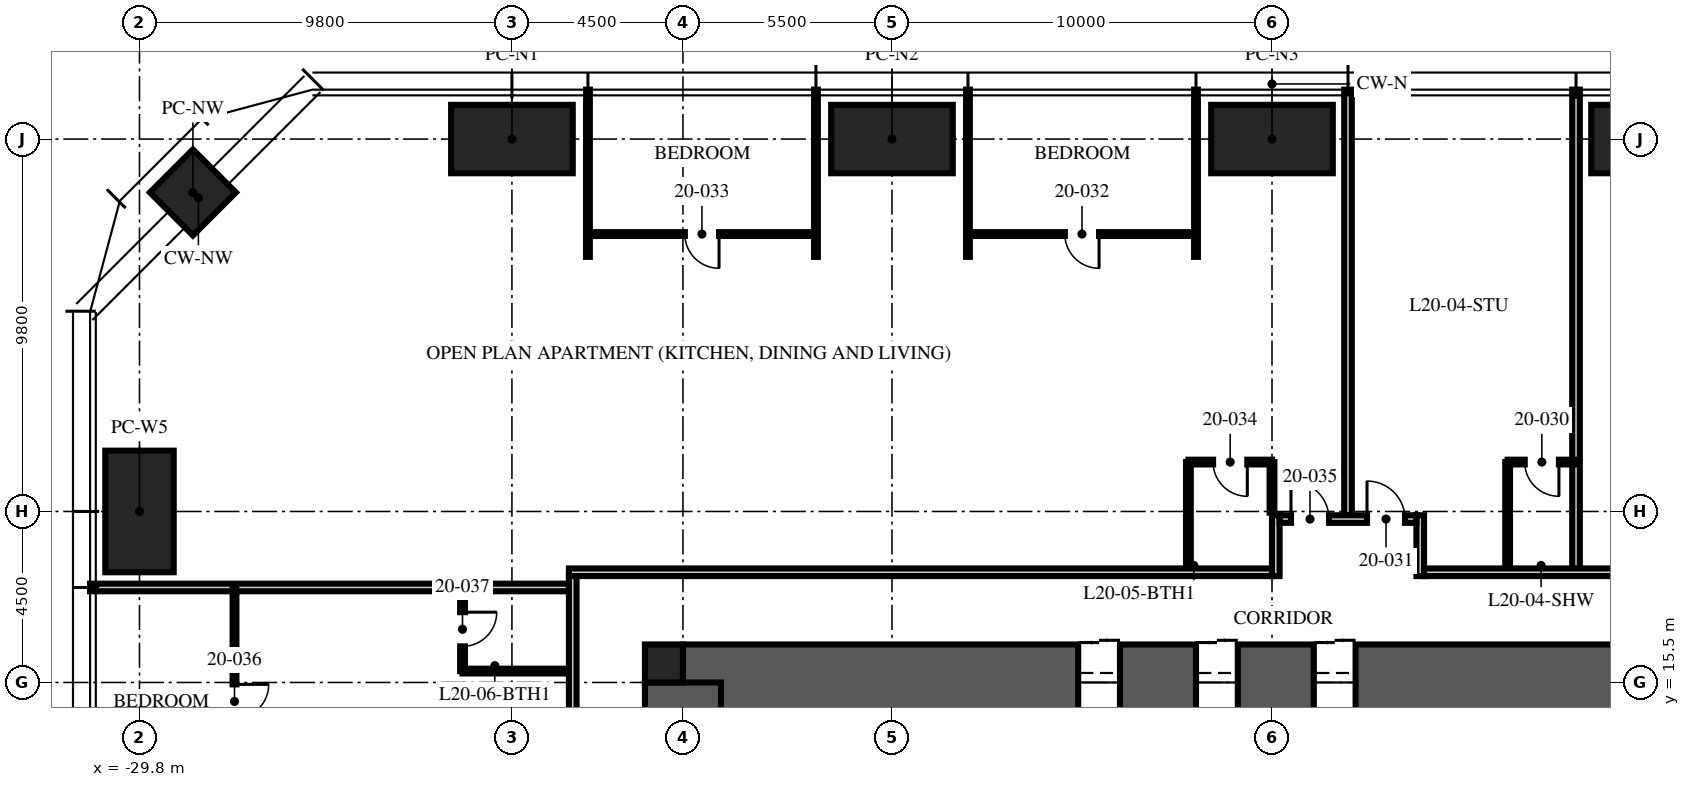
"""IFC4 building model, lengths in metres.
Left out: names, types, materials, properties, quantities, classifications, styles, units other than length and angle.
Written with IfcOpenShell. Run it as: python <this file> out.ifc"""

import sys

from ifc_helpers import new_model, si_unit, direction, frame, frame_2d, origin, origin_2d, place, context, subcontext, project, spatial, rectangle, hollow_rectangle, extrude, element, fill, save


model = new_model("IFC4")
c1 = context("Model", 3, precision=1e-05, world=origin(), true_north=direction((0.0, 1.0)))
c2 = subcontext(c1, "Body", "Model", "MODEL_VIEW")
j1 = project(units=[si_unit("LENGTHUNIT", "METRE"), si_unit("PLANEANGLEUNIT", "RADIAN")], contexts=[c1])
p1 = place(None, origin())
s1 = spatial("IfcSite", under=j1, at=p1, CompositionType="ELEMENT")
p2 = place(p1, origin())
s2 = spatial("IfcBuilding", under=s1, at=p2, CompositionType="ELEMENT")
p3 = place(p2, frame((0.0, 0.0, 81.0)))
s3 = spatial("IfcBuildingStorey", under=s2, at=p3, CompositionType="ELEMENT", Elevation=81.0)
p4 = place(p3, frame((-15.5, 15.5, -0.25), z_axis=(0.0, 0.0, 1.0), x_axis=(1.0, 0.0, 0.0)))
e1 = element("IfcWall", 1, at=p4, inside=s3, PredefinedType="SHEAR", context=c2, shape_type="SweptSolid", body=[
    extrude(rectangle(XDim=31.0, YDim=2.0, at=frame_2d((15.5, 0.0))), origin(), (0.0, 0.0, 1.0), 3.75),
])
p5 = place(p4, frame((10.4, 0.0, 0.25)))
e2 = element("IfcOpeningElement", 2, at=p5, cuts=e1, PredefinedType="OPENING", context=c2, shape_type="SweptSolid", body=[
    extrude(rectangle(XDim=1.1, YDim=2.1, at=frame_2d((0.55, 1.05))), frame((0.0, 1.01, 0.0), z_axis=(0.0, -1.0, 0.0), x_axis=(1.0, 0.0, 0.0)), (0.0, 0.0, 1.0), 2.02),
])
p6 = place(p4, frame((13.5, 0.0, 0.25)))
e3 = element("IfcOpeningElement", 3, at=p6, cuts=e1, PredefinedType="OPENING", context=c2, shape_type="SweptSolid", body=[
    extrude(rectangle(XDim=1.1, YDim=2.1, at=frame_2d((0.55, 1.05))), frame((0.0, 1.01, 0.0), z_axis=(0.0, -1.0, 0.0), x_axis=(1.0, 0.0, 0.0)), (0.0, 0.0, 1.0), 2.02),
])
p7 = place(p4, frame((16.6, 0.0, 0.25)))
e4 = element("IfcOpeningElement", 4, at=p7, cuts=e1, PredefinedType="OPENING", context=c2, shape_type="SweptSolid", body=[
    extrude(rectangle(XDim=1.1, YDim=2.1, at=frame_2d((0.55, 1.05))), frame((0.0, 1.01, 0.0), z_axis=(0.0, -1.0, 0.0), x_axis=(1.0, 0.0, 0.0)), (0.0, 0.0, 1.0), 2.02),
])
p8 = place(p3, frame((-15.5, -15.5, -0.25), z_axis=(0.0, 0.0, 1.0), x_axis=(0.0, 1.0, 0.0)))
e5 = element("IfcWall", 5, at=p8, inside=s3, PredefinedType="SHEAR", context=c2, shape_type="SweptSolid", body=[
    extrude(rectangle(XDim=31.0, YDim=2.0, at=frame_2d((15.5, 0.0))), origin(), (0.0, 0.0, 1.0), 3.75),
])
p9 = place(p8, frame((6.5, 0.0, 0.25)))
e6 = element("IfcOpeningElement", 6, at=p9, cuts=e5, PredefinedType="OPENING", context=c2, shape_type="SweptSolid", body=[
    extrude(rectangle(XDim=1.2, YDim=2.1, at=frame_2d((0.6, 1.05))), frame((0.0, 1.01, 0.0), z_axis=(0.0, -1.0, 0.0), x_axis=(1.0, 0.0, 0.0)), (0.0, 0.0, 1.0), 2.02),
])
p10 = place(p8, frame((23.0, 0.0, 0.25)))
e7 = element("IfcOpeningElement", 7, at=p10, cuts=e5, PredefinedType="OPENING", context=c2, shape_type="SweptSolid", body=[
    extrude(rectangle(XDim=1.8, YDim=2.1, at=frame_2d((0.9, 1.05))), frame((0.0, 1.01, 0.0), z_axis=(0.0, -1.0, 0.0), x_axis=(1.0, 0.0, 0.0)), (0.0, 0.0, 1.0), 2.02),
])
p11 = place(p3, frame((-16.0, 16.0, -0.25), z_axis=(0.0, 0.0, 1.0), x_axis=(1.0, 0.0, 0.0)))
e8 = element("IfcColumn", 8, at=p11, inside=s3, PredefinedType="COLUMN", context=c2, shape_type="SweptSolid", body=[
    extrude(rectangle(XDim=1.0, YDim=1.0, at=origin_2d()), origin(), (0.0, 0.0, 1.0), 3.75),
])
for number, where, z_axis, x_axis in (
    (9, (-20.0, 29.8, 0.0), (0.0, 0.0, 1.0), (1.0, 0.0, 0.0)),
    (10, (-10.0, 29.8, 0.0), (0.0, 0.0, 1.0), (1.0, 0.0, 0.0)),
    (11, (0.0, 29.8, 0.0), (0.0, 0.0, 1.0), (1.0, 0.0, 0.0)),
    (12, (10.0, 29.8, 0.0), (0.0, 0.0, 1.0), (1.0, 0.0, 0.0)),
    (13, (-29.8, 20.0, 0.0), (0.0, 0.0, 1.0), (0.0, 1.0, 0.0)),
):
    element("IfcColumn", number, at=place(p3, frame(where, z_axis=z_axis, x_axis=x_axis)), inside=s3, PredefinedType="COLUMN", context=c2, shape_type="SweptSolid", body=[
        extrude(hollow_rectangle(XDim=3.2, YDim=1.8, WallThickness=0.2, at=origin_2d()), origin(), (0.0, 0.0, 1.0), 3.75),
    ])
p12 = place(p3, frame((-28.394, 28.394, 0.0), z_axis=(0.0, 0.0, 1.0), x_axis=(0.707106781187, 0.707106781187, 0.0)))
e14 = element("IfcColumn", 14, at=p12, inside=s3, PredefinedType="COLUMN", context=c2, shape_type="SweptSolid", body=[
    extrude(hollow_rectangle(XDim=1.6, YDim=1.6, WallThickness=0.1, at=origin_2d()), origin(), (0.0, 0.0, 1.0), 3.75),
])
p13 = place(p3, frame((8.0, 18.5, 0.0), z_axis=(0.0, 0.0, 1.0), x_axis=(0.0, 1.0, 0.0)))
e15 = element("IfcWall", 15, at=p13, inside=s3, PredefinedType="PARTITIONING", context=c2, shape_type="SweptSolid", body=[
    extrude(rectangle(XDim=12.6, YDim=0.2, at=frame_2d((6.3, 0.0))), origin(), (0.0, 0.0, 1.0), 2.71),
])
p14 = place(p3, frame((2.0, 19.9, 0.0), z_axis=(0.0, 0.0, 1.0), x_axis=(0.0, 1.0, 0.0)))
e16 = element("IfcWall", 16, at=p14, inside=s3, PredefinedType="PARTITIONING", context=c2, shape_type="SweptSolid", body=[
    extrude(rectangle(XDim=11.2, YDim=0.2, at=frame_2d((5.6, 0.0))), origin(), (0.0, 0.0, 1.0), 2.71),
])
for number, where, z_axis, x_axis in (
    (17, (-2.0, 26.7, 0.0), (0.0, 0.0, 1.0), (0.0, 1.0, 0.0)),
    (18, (-8.0, 26.7, 0.0), (0.0, 0.0, 1.0), (0.0, 1.0, 0.0)),
    (19, (-12.0, 26.7, 0.0), (0.0, 0.0, 1.0), (0.0, 1.0, 0.0)),
    (20, (-18.0, 26.7, 0.0), (0.0, 0.0, 1.0), (0.0, 1.0, 0.0)),
):
    element("IfcWall", number, at=place(p3, frame(where, z_axis=z_axis, x_axis=x_axis)), inside=s3, PredefinedType="PARTITIONING", context=c2, shape_type="SweptSolid", body=[
        extrude(rectangle(XDim=4.4, YDim=0.1, at=frame_2d((2.2, 0.0))), origin(), (0.0, 0.0, 1.0), 2.71),
    ])
p15 = place(p3, frame((-18.5, 18.0, 0.0), z_axis=(0.0, 0.0, 1.0), x_axis=(-1.0, 0.0, 0.0)))
e21 = element("IfcWall", 21, at=p15, inside=s3, PredefinedType="PARTITIONING", context=c2, shape_type="SweptSolid", body=[
    extrude(rectangle(XDim=12.6, YDim=0.2, at=frame_2d((6.3, 0.0))), origin(), (0.0, 0.0, 1.0), 2.3),
])
p16 = place(p3, frame((8.0, 21.3, 0.0), z_axis=(0.0, 0.0, 1.0), x_axis=(-1.0, 0.0, 0.0)))
e22 = element("IfcWall", 22, at=p16, inside=s3, PredefinedType="PARTITIONING", context=c2, shape_type="SweptSolid", body=[
    extrude(rectangle(XDim=1.8, YDim=0.125, at=frame_2d((0.9, 0.0))), origin(), (0.0, 0.0, 1.0), 3.5),
])
p17 = place(p16, frame((0.45, 0.0, 0.0)))
e23 = element("IfcOpeningElement", 23, at=p17, cuts=e22, PredefinedType="OPENING", context=c2, shape_type="SweptSolid", body=[
    extrude(rectangle(XDim=0.9, YDim=2.1, at=frame_2d((0.45, 1.05))), frame((0.0, 0.073, 0.0), z_axis=(0.0, -1.0, 0.0), x_axis=(1.0, 0.0, 0.0)), (0.0, 0.0, 1.0), 0.145),
])
p18 = place(p3, frame((6.2, 18.5, 0.0), z_axis=(0.0, 0.0, 1.0), x_axis=(0.0, 1.0, 0.0)))
e24 = element("IfcWall", 24, at=p18, inside=s3, PredefinedType="PARTITIONING", context=c2, shape_type="SweptSolid", body=[
    extrude(rectangle(XDim=2.8, YDim=0.125, at=frame_2d((1.4, 0.0))), origin(), (0.0, 0.0, 1.0), 3.5),
])
p19 = place(p3, frame((-2.0, 27.3, 0.0), z_axis=(0.0, 0.0, 1.0), x_axis=(-1.0, 0.0, 0.0)))
e25 = element("IfcWall", 25, at=p19, inside=s3, PredefinedType="PARTITIONING", context=c2, shape_type="SweptSolid", body=[
    extrude(rectangle(XDim=6.0, YDim=0.1, at=frame_2d((3.0, 0.0))), origin(), (0.0, 0.0, 1.0), 2.61),
])
p20 = place(p19, frame((2.55, 0.0, 0.0)))
e26 = element("IfcOpeningElement", 26, at=p20, cuts=e25, PredefinedType="OPENING", context=c2, shape_type="SweptSolid", body=[
    extrude(rectangle(XDim=0.9, YDim=2.1, at=frame_2d((0.45, 1.05))), frame((0.0, 0.06, 0.0), z_axis=(0.0, -1.0, 0.0), x_axis=(1.0, 0.0, 0.0)), (0.0, 0.0, 1.0), 0.12),
])
p21 = place(p3, frame((-12.0, 27.3, 0.0), z_axis=(0.0, 0.0, 1.0), x_axis=(-1.0, 0.0, 0.0)))
e27 = element("IfcWall", 27, at=p21, inside=s3, PredefinedType="PARTITIONING", context=c2, shape_type="SweptSolid", body=[
    extrude(rectangle(XDim=6.0, YDim=0.1, at=frame_2d((3.0, 0.0))), origin(), (0.0, 0.0, 1.0), 2.61),
])
p22 = place(p21, frame((2.55, 0.0, 0.0)))
e28 = element("IfcOpeningElement", 28, at=p22, cuts=e27, PredefinedType="OPENING", context=c2, shape_type="SweptSolid", body=[
    extrude(rectangle(XDim=0.9, YDim=2.1, at=frame_2d((0.45, 1.05))), frame((0.0, 0.06, 0.0), z_axis=(0.0, -1.0, 0.0), x_axis=(1.0, 0.0, 0.0)), (0.0, 0.0, 1.0), 0.12),
])
p23 = place(p3, frame((0.0, 21.3, 0.0), z_axis=(0.0, 0.0, 1.0), x_axis=(-1.0, 0.0, 0.0)))
e29 = element("IfcWall", 29, at=p23, inside=s3, PredefinedType="PARTITIONING", context=c2, shape_type="SweptSolid", body=[
    extrude(rectangle(XDim=2.2, YDim=0.125, at=frame_2d((1.1, 0.0))), origin(), (0.0, 0.0, 1.0), 2.492),
])
p24 = place(p23, frame((0.65, 0.0, 0.0)))
e30 = element("IfcOpeningElement", 30, at=p24, cuts=e29, PredefinedType="OPENING", context=c2, shape_type="SweptSolid", body=[
    extrude(rectangle(XDim=0.9, YDim=2.1, at=frame_2d((0.45, 1.05))), frame((0.0, 0.073, 0.0), z_axis=(0.0, -1.0, 0.0), x_axis=(1.0, 0.0, 0.0)), (0.0, 0.0, 1.0), 0.145),
])
p25 = place(p3, frame((0.0, 19.97, 0.0), z_axis=(0.0, 0.0, 1.0), x_axis=(0.0, 1.0, 0.0)))
e31 = element("IfcWall", 31, at=p25, inside=s3, PredefinedType="PARTITIONING", context=c2, shape_type="SweptSolid", body=[
    extrude(rectangle(XDim=1.33, YDim=0.125, at=frame_2d((0.665, 0.0))), origin(), (0.0, 0.0, 1.0), 2.492),
])
p26 = place(p3, frame((-2.2, 18.5, 0.0), z_axis=(0.0, 0.0, 1.0), x_axis=(0.0, 1.0, 0.0)))
e32 = element("IfcWall", 32, at=p26, inside=s3, PredefinedType="PARTITIONING", context=c2, shape_type="SweptSolid", body=[
    extrude(rectangle(XDim=2.8, YDim=0.125, at=frame_2d((1.4, 0.0))), origin(), (0.0, 0.0, 1.0), 3.5),
])
p27 = place(p3, frame((-27.3, 18.0, 0.0), z_axis=(0.0, 0.0, 1.0), x_axis=(0.0, -1.0, 0.0)))
e33 = element("IfcWall", 33, at=p27, inside=s3, PredefinedType="PARTITIONING", context=c2, shape_type="SweptSolid", body=[
    extrude(rectangle(XDim=6.0, YDim=0.1, at=frame_2d((3.0, 0.0))), origin(), (0.0, 0.0, 1.0), 2.61),
])
p28 = place(p27, frame((2.55, 0.0, 0.0)))
e34 = element("IfcOpeningElement", 34, at=p28, cuts=e33, PredefinedType="OPENING", context=c2, shape_type="SweptSolid", body=[
    extrude(rectangle(XDim=0.9, YDim=2.1, at=frame_2d((0.45, 1.05))), frame((0.0, 0.06, 0.0), z_axis=(0.0, -1.0, 0.0), x_axis=(1.0, 0.0, 0.0)), (0.0, 0.0, 1.0), 0.12),
])
p29 = place(p3, frame((-21.3, 18.0, 0.0), z_axis=(0.0, 0.0, 1.0), x_axis=(0.0, -1.0, 0.0)))
e35 = element("IfcWall", 35, at=p29, inside=s3, PredefinedType="PARTITIONING", context=c2, shape_type="SweptSolid", body=[
    extrude(rectangle(XDim=2.2, YDim=0.125, at=frame_2d((1.1, 0.0))), origin(), (0.0, 0.0, 1.0), 3.5),
])
p30 = place(p29, frame((0.65, 0.0, 0.0)))
e36 = element("IfcOpeningElement", 36, at=p30, cuts=e35, PredefinedType="OPENING", context=c2, shape_type="SweptSolid", body=[
    extrude(rectangle(XDim=0.9, YDim=2.1, at=frame_2d((0.45, 1.05))), frame((0.0, 0.073, 0.0), z_axis=(0.0, -1.0, 0.0), x_axis=(1.0, 0.0, 0.0)), (0.0, 0.0, 1.0), 0.145),
])
p31 = place(p3, frame((-18.5, 15.8, 0.0), z_axis=(0.0, 0.0, 1.0), x_axis=(-1.0, 0.0, 0.0)))
e37 = element("IfcWall", 37, at=p31, inside=s3, PredefinedType="PARTITIONING", context=c2, shape_type="SweptSolid", body=[
    extrude(rectangle(XDim=2.8, YDim=0.125, at=frame_2d((1.4, 0.0))), origin(), (0.0, 0.0, 1.0), 3.5),
])
p32 = place(p3, frame((-18.5, 18.4, 0.0), z_axis=(0.0, 0.0, 1.0), x_axis=(1.0, 0.0, 0.0)))
e38 = element("IfcWall", 38, at=p32, inside=s3, PredefinedType="PARTITIONING", context=c2, shape_type="SweptSolid", body=[
    extrude(rectangle(XDim=18.5, YDim=0.2, at=frame_2d((9.25, 0.0))), origin(), (0.0, 0.0, 1.0), 2.3),
])
p33 = place(p3, frame((0.1, 18.3, 0.0), z_axis=(0.0, 0.0, 1.0), x_axis=(0.0, 1.0, 0.0)))
e39 = element("IfcWall", 39, at=p33, inside=s3, PredefinedType="PARTITIONING", context=c2, shape_type="SweptSolid", body=[
    extrude(rectangle(XDim=1.6, YDim=0.2, at=frame_2d((0.8, 0.0))), origin(), (0.0, 0.0, 1.0), 2.492),
])
p34 = place(p3, frame((3.9, 18.3, 0.0), z_axis=(0.0, 0.0, 1.0), x_axis=(0.0, 1.0, 0.0)))
e40 = element("IfcWall", 40, at=p34, inside=s3, PredefinedType="PARTITIONING", context=c2, shape_type="SweptSolid", body=[
    extrude(rectangle(XDim=1.6, YDim=0.2, at=frame_2d((0.8, 0.0))), origin(), (0.0, 0.0, 1.0), 3.5),
])
p35 = place(p3, frame((0.2, 19.8, 0.0), z_axis=(0.0, 0.0, 1.0), x_axis=(1.0, 0.0, 0.0)))
e41 = element("IfcWall", 41, at=p35, inside=s3, PredefinedType="PARTITIONING", context=c2, shape_type="SweptSolid", body=[
    extrude(rectangle(XDim=3.6, YDim=0.2, at=frame_2d((1.8, 0.0))), origin(), (0.0, 0.0, 1.0), 3.5),
])
p36 = place(p35, frame((2.3, 0.0, 0.0)))
e42 = element("IfcOpeningElement", 42, at=p36, cuts=e41, PredefinedType="OPENING", context=c2, shape_type="SweptSolid", body=[
    extrude(rectangle(XDim=1.0, YDim=2.2, at=frame_2d((0.5, 1.1))), frame((0.0, 0.11, 0.0), z_axis=(0.0, -1.0, 0.0), x_axis=(1.0, 0.0, 0.0)), (0.0, 0.0, 1.0), 0.22),
])
p37 = place(p35, frame((0.3, 0.0, 0.0)))
e43 = element("IfcOpeningElement", 43, at=p37, cuts=e41, PredefinedType="OPENING", context=c2, shape_type="SweptSolid", body=[
    extrude(rectangle(XDim=1.0, YDim=2.2, at=frame_2d((0.5, 1.1))), frame((0.0, 0.11, 0.0), z_axis=(0.0, -1.0, 0.0), x_axis=(1.0, 0.0, 0.0)), (0.0, 0.0, 1.0), 0.22),
])
p38 = place(p3, frame((4.0, 18.4, 0.0), z_axis=(0.0, 0.0, 1.0), x_axis=(1.0, 0.0, 0.0)))
e44 = element("IfcWall", 44, at=p38, inside=s3, PredefinedType="PARTITIONING", context=c2, shape_type="SweptSolid", body=[
    extrude(rectangle(XDim=14.5, YDim=0.2, at=frame_2d((7.25, 0.0))), origin(), (0.0, 0.0, 1.0), 2.3),
])
p39 = place(p3, frame((-18.4, 18.3, 0.0), z_axis=(0.0, 0.0, 1.0), x_axis=(0.0, -1.0, 0.0)))
e45 = element("IfcWall", 45, at=p39, inside=s3, PredefinedType="PARTITIONING", context=c2, shape_type="SweptSolid", body=[
    extrude(rectangle(XDim=8.3, YDim=0.2, at=frame_2d((4.15, 0.0))), origin(), (0.0, 0.0, 1.0), 2.3),
])
p40 = place(p5, origin())
e46 = element("IfcDoor", 46, at=p40, inside=s3, OperationType="DOUBLE_DOOR_SLIDING", PredefinedType="DOOR", context=c2, shape_type="SweptSolid", body=[
    extrude(rectangle(XDim=1.1, YDim=2.1, at=frame_2d((0.55, 1.05))), frame((0.0, 0.025, 0.0), z_axis=(0.0, -1.0, 0.0), x_axis=(1.0, 0.0, 0.0)), (0.0, 0.0, 1.0), 0.05),
])
fill(e2, e46)
p41 = place(p6, origin())
e47 = element("IfcDoor", 47, at=p41, inside=s3, OperationType="DOUBLE_DOOR_SLIDING", PredefinedType="DOOR", context=c2, shape_type="SweptSolid", body=[
    extrude(rectangle(XDim=1.1, YDim=2.1, at=frame_2d((0.55, 1.05))), frame((0.0, 0.025, 0.0), z_axis=(0.0, -1.0, 0.0), x_axis=(1.0, 0.0, 0.0)), (0.0, 0.0, 1.0), 0.05),
])
fill(e3, e47)
p42 = place(p7, origin())
e48 = element("IfcDoor", 48, at=p42, inside=s3, OperationType="DOUBLE_DOOR_SLIDING", PredefinedType="DOOR", context=c2, shape_type="SweptSolid", body=[
    extrude(rectangle(XDim=1.1, YDim=2.1, at=frame_2d((0.55, 1.05))), frame((0.0, 0.025, 0.0), z_axis=(0.0, -1.0, 0.0), x_axis=(1.0, 0.0, 0.0)), (0.0, 0.0, 1.0), 0.05),
])
fill(e4, e48)
p43 = place(p17, origin())
e49 = element("IfcDoor", 49, at=p43, inside=s3, OperationType="SINGLE_SWING_LEFT", PredefinedType="DOOR", context=c2, shape_type="SweptSolid", body=[
    extrude(rectangle(XDim=0.9, YDim=2.1, at=frame_2d((0.45, 1.05))), frame((0.0, 0.025, 0.0), z_axis=(0.0, -1.0, 0.0), x_axis=(1.0, 0.0, 0.0)), (0.0, 0.0, 1.0), 0.05),
])
fill(e23, e49)
p44 = place(p36, origin())
e50 = element("IfcDoor", 50, at=p44, inside=s3, OperationType="SINGLE_SWING_LEFT", PredefinedType="DOOR", context=c2, shape_type="SweptSolid", body=[
    extrude(rectangle(XDim=1.0, YDim=2.2, at=frame_2d((0.5, 1.1))), frame((0.0, 0.025, 0.0), z_axis=(0.0, -1.0, 0.0), x_axis=(1.0, 0.0, 0.0)), (0.0, 0.0, 1.0), 0.05),
])
fill(e42, e50)
p45 = place(p20, origin())
e51 = element("IfcDoor", 51, at=p45, inside=s3, OperationType="SINGLE_SWING_LEFT", PredefinedType="DOOR", context=c2, shape_type="SweptSolid", body=[
    extrude(rectangle(XDim=0.9, YDim=2.1, at=frame_2d((0.45, 1.05))), frame((0.0, 0.025, 0.0), z_axis=(0.0, -1.0, 0.0), x_axis=(1.0, 0.0, 0.0)), (0.0, 0.0, 1.0), 0.05),
])
fill(e26, e51)
p46 = place(p22, origin())
e52 = element("IfcDoor", 52, at=p46, inside=s3, OperationType="SINGLE_SWING_LEFT", PredefinedType="DOOR", context=c2, shape_type="SweptSolid", body=[
    extrude(rectangle(XDim=0.9, YDim=2.1, at=frame_2d((0.45, 1.05))), frame((0.0, 0.025, 0.0), z_axis=(0.0, -1.0, 0.0), x_axis=(1.0, 0.0, 0.0)), (0.0, 0.0, 1.0), 0.05),
])
fill(e28, e52)
p47 = place(p24, origin())
e53 = element("IfcDoor", 53, at=p47, inside=s3, OperationType="SINGLE_SWING_LEFT", PredefinedType="DOOR", context=c2, shape_type="SweptSolid", body=[
    extrude(rectangle(XDim=0.9, YDim=2.1, at=frame_2d((0.45, 1.05))), frame((0.0, 0.025, 0.0), z_axis=(0.0, -1.0, 0.0), x_axis=(1.0, 0.0, 0.0)), (0.0, 0.0, 1.0), 0.05),
])
fill(e30, e53)
p48 = place(p37, origin())
e54 = element("IfcDoor", 54, at=p48, inside=s3, OperationType="SINGLE_SWING_LEFT", PredefinedType="DOOR", context=c2, shape_type="SweptSolid", body=[
    extrude(rectangle(XDim=1.0, YDim=2.2, at=frame_2d((0.5, 1.1))), frame((0.0, 0.025, 0.0), z_axis=(0.0, -1.0, 0.0), x_axis=(1.0, 0.0, 0.0)), (0.0, 0.0, 1.0), 0.05),
])
fill(e43, e54)
p49 = place(p28, origin())
e55 = element("IfcDoor", 55, at=p49, inside=s3, OperationType="SINGLE_SWING_LEFT", PredefinedType="DOOR", context=c2, shape_type="SweptSolid", body=[
    extrude(rectangle(XDim=0.9, YDim=2.1, at=frame_2d((0.45, 1.05))), frame((0.0, 0.025, 0.0), z_axis=(0.0, -1.0, 0.0), x_axis=(1.0, 0.0, 0.0)), (0.0, 0.0, 1.0), 0.05),
])
fill(e34, e55)
p50 = place(p30, origin())
e56 = element("IfcDoor", 56, at=p50, inside=s3, OperationType="SINGLE_SWING_LEFT", PredefinedType="DOOR", context=c2, shape_type="SweptSolid", body=[
    extrude(rectangle(XDim=0.9, YDim=2.1, at=frame_2d((0.45, 1.05))), frame((0.0, 0.025, 0.0), z_axis=(0.0, -1.0, 0.0), x_axis=(1.0, 0.0, 0.0)), (0.0, 0.0, 1.0), 0.05),
])
fill(e36, e56)
save(model, sys.argv[1])
